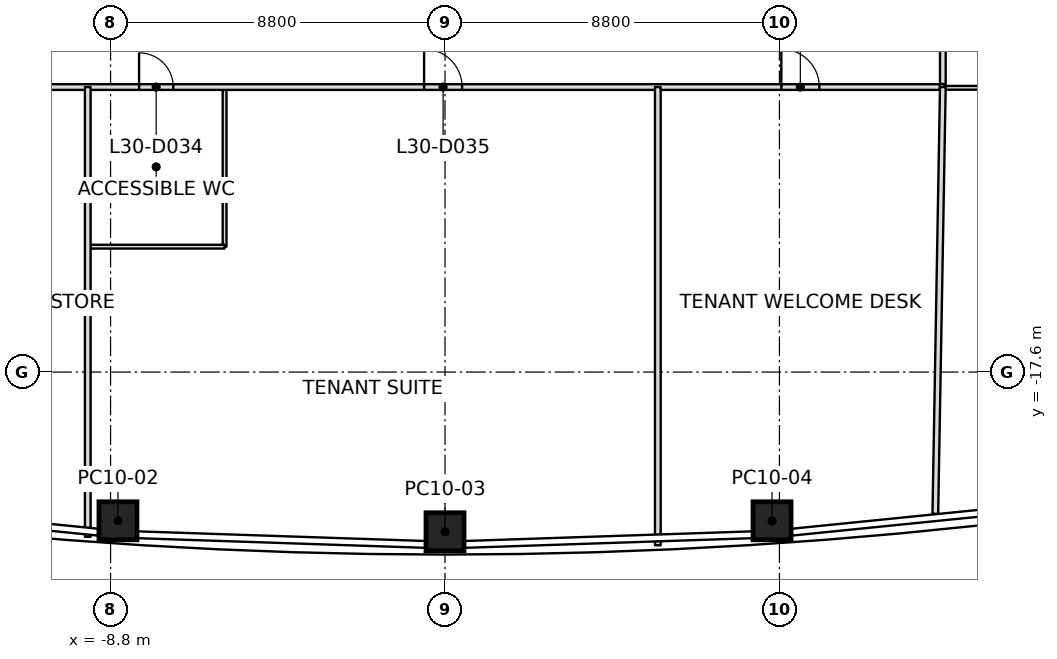
"""IFC4 building model, lengths in metres.
Left out: names, types, materials, properties, quantities, classifications, styles, units other than length and angle.
Written with IfcOpenShell. Run it as: python <this file> out.ifc"""

import sys

from ifc_helpers import new_model, si_unit, direction, frame, frame_2d, origin, origin_2d, place, context, subcontext, project, spatial, rectangle, extrude, element, fill, save


model = new_model("IFC4")
c1 = context("Model", 3, precision=1e-05, world=origin(), true_north=direction((0.0, 1.0)))
c2 = subcontext(c1, "Body", "Model", "MODEL_VIEW")
j1 = project(units=[si_unit("LENGTHUNIT", "METRE"), si_unit("PLANEANGLEUNIT", "RADIAN")], contexts=[c1])
p1 = place(None, origin())
s1 = spatial("IfcSite", under=j1, at=p1, CompositionType="ELEMENT")
p2 = place(p1, origin())
s2 = spatial("IfcBuilding", under=s1, at=p2, CompositionType="ELEMENT")
p3 = place(p2, frame((0.0, 0.0, 141.8)))
s3 = spatial("IfcBuildingStorey", under=s2, at=p3, CompositionType="ELEMENT", Elevation=141.8)
p4 = place(p3, frame((-8.606, -21.514, 0.0), z_axis=(0.008910223283, 0.011168293567, 0.999897933361), x_axis=(-0.997711841726, 0.067117835077, 0.008141074528)))
e1 = element("IfcColumn", 1, at=p4, inside=s3, PredefinedType="COLUMN", context=c2, shape_type="SweptSolid", body=[
    extrude(rectangle(XDim=1.0, YDim=1.0, at=origin_2d()), origin(), (0.0, 0.0, 1.0), 4.0),
])
p5 = place(p3, frame((0.0, -21.803, 0.0), z_axis=(0.0, 0.011473854038, 0.99993417317), x_axis=(1.0, 0.0, 0.0)))
e2 = element("IfcColumn", 2, at=p5, inside=s3, PredefinedType="COLUMN", context=c2, shape_type="SweptSolid", body=[
    extrude(rectangle(XDim=1.0, YDim=1.0, at=origin_2d()), origin(), (0.0, 0.0, 1.0), 4.0),
])
p6 = place(p3, frame((8.606, -21.514, 0.0), z_axis=(-0.008910223283, 0.011168293567, 0.999897933361), x_axis=(0.997711841726, 0.067117835077, 0.008141074528)))
e3 = element("IfcColumn", 3, at=p6, inside=s3, PredefinedType="COLUMN", context=c2, shape_type="SweptSolid", body=[
    extrude(rectangle(XDim=1.0, YDim=1.0, at=origin_2d()), origin(), (0.0, 0.0, 1.0), 4.0),
])
p7 = place(p3, frame((-9.4, -10.1, 0.0), z_axis=(0.0, 0.0, 1.0), x_axis=(0.0, -1.0, 0.0)))
e4 = element("IfcWall", 4, at=p7, inside=s3, PredefinedType="PARTITIONING", context=c2, shape_type="SweptSolid", body=[
    extrude(rectangle(XDim=11.836, YDim=0.15, at=frame_2d((5.918, 0.0))), origin(), (0.0, 0.0, 1.0), 3.234),
])
p8 = place(p3, frame((5.6, -10.1, 0.0), z_axis=(0.0, 0.0, 1.0), x_axis=(0.0, -1.0, 0.0)))
e5 = element("IfcWall", 5, at=p8, inside=s3, PredefinedType="PARTITIONING", context=c2, shape_type="SweptSolid", body=[
    extrude(rectangle(XDim=12.059, YDim=0.15, at=frame_2d((6.029, 0.0))), origin(), (0.0, 0.0, 1.0), 3.234),
])
p9 = place(p3, frame((13.1, -10.1, 0.0), z_axis=(0.0, 0.0, 1.0), x_axis=(-0.017647123272, -0.999844277395, 0.0)))
e6 = element("IfcWall", 6, at=p9, inside=s3, PredefinedType="PARTITIONING", context=c2, shape_type="SweptSolid", body=[
    extrude(rectangle(XDim=11.234, YDim=0.15, at=frame_2d((5.617, 0.0))), origin(), (0.0, 0.0, 1.0), 3.234),
])
p10 = place(p3, frame((-13.02, -10.1, 0.0), z_axis=(0.0, 0.0, 1.0), x_axis=(1.0, 0.0, 0.0)))
e7 = element("IfcWall", 7, at=p10, inside=s3, PredefinedType="PARTITIONING", context=c2, shape_type="SweptSolid", body=[
    extrude(rectangle(XDim=26.04, YDim=0.15, at=frame_2d((13.02, 0.0))), origin(), (0.0, 0.0, 1.0), 3.317),
])
p11 = place(p10, frame((1.27, 0.0, 0.0)))
e8 = element("IfcOpeningElement", 8, at=p11, cuts=e7, PredefinedType="OPENING", context=c2, shape_type="SweptSolid", body=[
    extrude(rectangle(XDim=1.0, YDim=2.1, at=frame_2d((0.5, 1.05))), frame((0.0, 0.075, 0.0), z_axis=(0.0, -1.0, 0.0), x_axis=(1.0, 0.0, 0.0)), (0.0, 0.0, 1.0), 0.15),
])
p12 = place(p10, frame((4.97, 0.0, 0.0)))
e9 = element("IfcOpeningElement", 9, at=p12, cuts=e7, PredefinedType="OPENING", context=c2, shape_type="SweptSolid", body=[
    extrude(rectangle(XDim=0.9, YDim=2.1, at=frame_2d((0.45, 1.05))), frame((0.0, 0.075, 0.0), z_axis=(0.0, -1.0, 0.0), x_axis=(1.0, 0.0, 0.0)), (0.0, 0.0, 1.0), 0.15),
])
p13 = place(p10, frame((12.47, 0.0, 0.0)))
e10 = element("IfcOpeningElement", 10, at=p13, cuts=e7, PredefinedType="OPENING", context=c2, shape_type="SweptSolid", body=[
    extrude(rectangle(XDim=1.0, YDim=2.1, at=frame_2d((0.5, 1.05))), frame((0.0, 0.075, 0.0), z_axis=(0.0, -1.0, 0.0), x_axis=(1.0, 0.0, 0.0)), (0.0, 0.0, 1.0), 0.15),
])
p14 = place(p10, frame((21.87, 0.0, 0.0)))
e11 = element("IfcOpeningElement", 11, at=p14, cuts=e7, PredefinedType="OPENING", context=c2, shape_type="SweptSolid", body=[
    extrude(rectangle(XDim=1.0, YDim=2.1, at=frame_2d((0.5, 1.05))), frame((0.0, 0.075, 0.0), z_axis=(0.0, -1.0, 0.0), x_axis=(1.0, 0.0, 0.0)), (0.0, 0.0, 1.0), 0.15),
])
p15 = place(p3, frame((13.1, -10.02, 0.0), z_axis=(0.0, 0.0, 1.0), x_axis=(0.0, 1.0, 0.0)))
e12 = element("IfcWall", 12, at=p15, inside=s3, PredefinedType="PARTITIONING", context=c2, shape_type="SweptSolid", body=[
    extrude(rectangle(XDim=19.608, YDim=0.15, at=frame_2d((9.804, 0.0))), origin(), (0.0, 0.0, 1.0), 3.166),
])
p16 = place(p15, frame((1.95, 0.0, 0.0)))
e13 = element("IfcOpeningElement", 13, at=p16, cuts=e12, PredefinedType="OPENING", context=c2, shape_type="SweptSolid", body=[
    extrude(rectangle(XDim=0.9, YDim=2.1, at=frame_2d((0.45, 1.05))), frame((0.0, 0.075, 0.0), z_axis=(0.0, -1.0, 0.0), x_axis=(1.0, 0.0, 0.0)), (0.0, 0.0, 1.0), 0.15),
])
p17 = place(p15, frame((11.804, 0.0, 0.0)))
e14 = element("IfcOpeningElement", 14, at=p17, cuts=e12, PredefinedType="OPENING", context=c2, shape_type="SweptSolid", body=[
    extrude(rectangle(XDim=1.0, YDim=2.1, at=frame_2d((0.5, 1.05))), frame((0.0, 0.075, 0.0), z_axis=(0.0, -1.0, 0.0), x_axis=(1.0, 0.0, 0.0)), (0.0, 0.0, 1.0), 0.15),
])
p18 = place(p3, frame((-5.8, -10.13, 0.0), z_axis=(0.0, 0.0, 1.0), x_axis=(0.0, -1.0, 0.0)))
e15 = element("IfcWall", 15, at=p18, inside=s3, PredefinedType="PARTITIONING", context=c2, shape_type="SweptSolid", body=[
    extrude(rectangle(XDim=4.17, YDim=0.1, at=frame_2d((2.085, 0.0))), origin(), (0.0, 0.0, 1.0), 3.45),
])
p19 = place(p3, frame((-5.8, -14.3, 0.0), z_axis=(0.0, 0.0, 1.0), x_axis=(-1.0, 0.0, 0.0)))
e16 = element("IfcWall", 16, at=p19, inside=s3, PredefinedType="PARTITIONING", context=c2, shape_type="SweptSolid", body=[
    extrude(rectangle(XDim=3.57, YDim=0.1, at=frame_2d((1.785, 0.0))), origin(), (0.0, 0.0, 1.0), 3.317),
])
p20 = place(p3, frame((19.1, -10.12, 0.0), z_axis=(0.0, 0.0, 1.0), x_axis=(-1.0, 0.0, 0.0)))
e17 = element("IfcWall", 17, at=p20, inside=s3, PredefinedType="PARTITIONING", context=c2, shape_type="SweptSolid", body=[
    extrude(rectangle(XDim=5.97, YDim=0.1, at=frame_2d((2.985, 0.0))), origin(), (0.0, 0.0, 1.0), 3.166),
])
p21 = place(p12, origin())
e18 = element("IfcDoor", 18, at=p21, inside=s3, OperationType="SINGLE_SWING_RIGHT", PredefinedType="DOOR", context=c2, shape_type="SweptSolid", body=[
    extrude(rectangle(XDim=0.9, YDim=2.1, at=frame_2d((0.45, 1.05))), frame((0.0, 0.025, 0.0), z_axis=(0.0, -1.0, 0.0), x_axis=(1.0, 0.0, 0.0)), (0.0, 0.0, 1.0), 0.05),
])
fill(e9, e18)
p22 = place(p13, origin())
e19 = element("IfcDoor", 19, at=p22, inside=s3, OperationType="SINGLE_SWING_LEFT", PredefinedType="DOOR", context=c2, shape_type="SweptSolid", body=[
    extrude(rectangle(XDim=1.0, YDim=2.1, at=frame_2d((0.5, 1.05))), frame((0.0, 0.025, 0.0), z_axis=(0.0, -1.0, 0.0), x_axis=(1.0, 0.0, 0.0)), (0.0, 0.0, 1.0), 0.05),
])
fill(e10, e19)
p23 = place(p14, origin())
e20 = element("IfcDoor", 20, at=p23, inside=s3, OperationType="SINGLE_SWING_LEFT", PredefinedType="DOOR", context=c2, shape_type="SweptSolid", body=[
    extrude(rectangle(XDim=1.0, YDim=2.1, at=frame_2d((0.5, 1.05))), frame((0.0, 0.025, 0.0), z_axis=(0.0, -1.0, 0.0), x_axis=(1.0, 0.0, 0.0)), (0.0, 0.0, 1.0), 0.05),
])
fill(e11, e20)
save(model, sys.argv[1])
